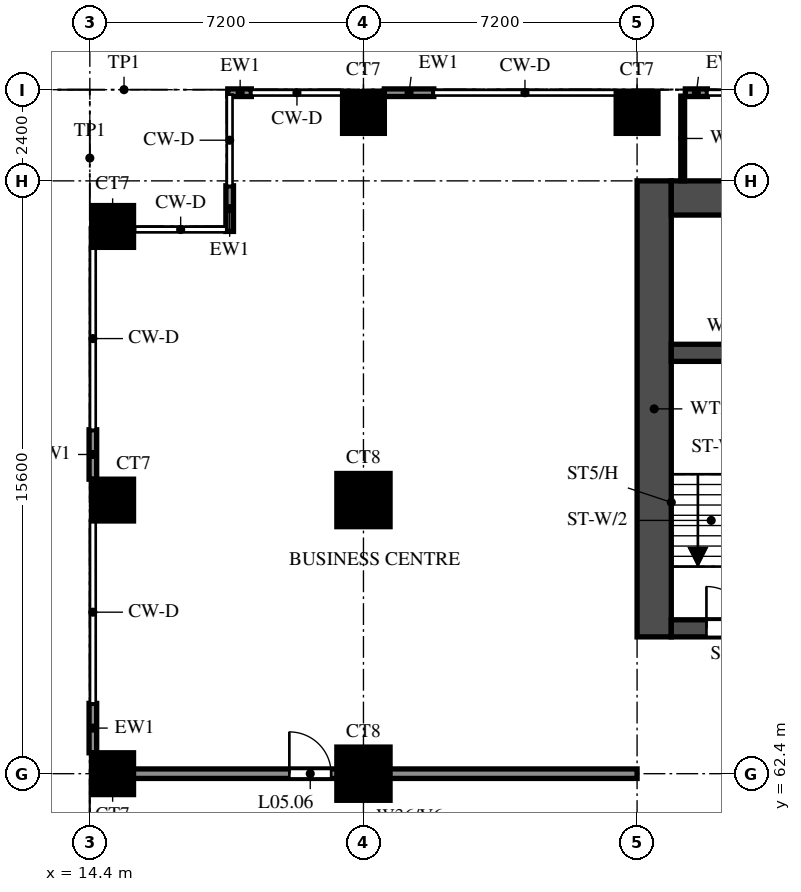
"""IFC4 building model, lengths in metres.
Left out: names, types, materials, properties, quantities, classifications, styles, units other than length and angle.
Written with IfcOpenShell. Run it as: python <this file> out.ifc"""

import sys

from ifc_helpers import new_model, si_unit, direction, frame, frame_2d, origin, origin_2d, place, context, subcontext, project, spatial, rectangle, extrude, source, transform, mapped, element, fill, save


model = new_model("IFC4")
c1 = context("Model", 3, precision=1e-05, world=origin(), true_north=direction((0.0, 1.0)))
c2 = subcontext(c1, "Body", "Model", "MODEL_VIEW")
j1 = project(units=[si_unit("LENGTHUNIT", "METRE"), si_unit("PLANEANGLEUNIT", "RADIAN")], contexts=[c1])
p1 = place(None, origin())
s1 = spatial("IfcSite", under=j1, at=p1, CompositionType="ELEMENT")
p2 = place(p1, origin())
s2 = spatial("IfcBuilding", under=s1, at=p2, CompositionType="ELEMENT")
p3 = place(p2, frame((0.0, 0.0, 27.0)))
s3 = spatial("IfcBuildingStorey", under=s2, at=p3, CompositionType="ELEMENT", Elevation=27.0)
m1 = source(origin(), c2, "Body", "SweptSolid", [
    extrude(rectangle(XDim=1.1, YDim=1.1, at=origin_2d()), origin(), (0.0, 0.0, 1.0), 3.18),
])
p4 = place(p3, frame((15.0, 62.4, 0.0), z_axis=(0.0, 0.0, 1.0), x_axis=(1.0, 0.0, 0.0)))
e1 = element("IfcColumn", 1, at=p4, inside=s3, PredefinedType="COLUMN", context=c2, shape_type="MappedRepresentation", body=[
    mapped(m1, transform((0.0, 0.0, 0.0))),
])
m2 = source(origin(), c2, "Body", "SweptSolid", [
    extrude(rectangle(XDim=1.4, YDim=1.4, at=origin_2d()), origin(), (0.0, 0.0, 1.0), 3.18),
])
p5 = place(p3, frame((21.6, 62.4, 0.0), z_axis=(0.0, 0.0, 1.0), x_axis=(1.0, 0.0, 0.0)))
e2 = element("IfcColumn", 2, at=p5, inside=s3, PredefinedType="COLUMN", context=c2, shape_type="MappedRepresentation", body=[
    mapped(m2, transform((0.0, 0.0, 0.0))),
])
p6 = place(p3, frame((15.0, 69.6, 0.0), z_axis=(0.0, 0.0, 1.0), x_axis=(1.0, 0.0, 0.0)))
e3 = element("IfcColumn", 3, at=p6, inside=s3, PredefinedType="COLUMN", context=c2, shape_type="MappedRepresentation", body=[
    mapped(m1, transform((0.0, 0.0, 0.0))),
])
p7 = place(p3, frame((21.6, 69.6, 0.0), z_axis=(0.0, 0.0, 1.0), x_axis=(1.0, 0.0, 0.0)))
e4 = element("IfcColumn", 4, at=p7, inside=s3, PredefinedType="COLUMN", context=c2, shape_type="MappedRepresentation", body=[
    mapped(m2, transform((0.0, 0.0, 0.0))),
])
for number, where, z_axis, x_axis in (
    (5, (15.0, 76.8, 0.0), (0.0, 0.0, 1.0), (1.0, 0.0, 0.0)),
    (6, (21.6, 79.8, 0.0), (0.0, 0.0, 1.0), (1.0, 0.0, 0.0)),
    (7, (28.8, 79.8, 0.0), (0.0, 0.0, 1.0), (1.0, 0.0, 0.0)),
):
    element("IfcColumn", number, at=place(p3, frame(where, z_axis=z_axis, x_axis=x_axis)), inside=s3, PredefinedType="COLUMN", context=c2, shape_type="MappedRepresentation", body=[
        mapped(m1, transform((0.0, 0.0, 0.0))),
    ])
p8 = place(p3, frame((29.25, 66.0, 0.0), z_axis=(0.0, 0.0, 1.0), x_axis=(0.0, 1.0, 0.0)))
e8 = element("IfcWall", 8, at=p8, inside=s3, PredefinedType="SHEAR", context=c2, shape_type="SweptSolid", body=[
    extrude(rectangle(XDim=12.0, YDim=0.9, at=frame_2d((6.0, 0.0))), origin(), (0.0, 0.0, 1.0), 3.18),
])
p9 = place(p3, frame((29.7, 77.55, 0.0), z_axis=(0.0, 0.0, 1.0), x_axis=(1.0, 0.0, 0.0)))
e9 = element("IfcWall", 9, at=p9, inside=s3, PredefinedType="SHEAR", context=c2, shape_type="SweptSolid", body=[
    extrude(rectangle(XDim=41.4, YDim=0.9, at=frame_2d((20.7, 0.0))), origin(), (0.0, 0.0, 1.0), 3.18),
])
p10 = place(p3, frame((29.7, 66.225, 0.0), z_axis=(0.0, 0.0, 1.0), x_axis=(1.0, 0.0, 0.0)))
e10 = element("IfcWall", 10, at=p10, inside=s3, PredefinedType="SHEAR", context=c2, shape_type="SweptSolid", body=[
    extrude(rectangle(XDim=41.4, YDim=0.45, at=frame_2d((20.7, 0.0))), origin(), (0.0, 0.0, 1.0), 3.18),
])
p11 = place(p10, frame((0.925, 0.0, 0.0)))
e11 = element("IfcOpeningElement", 11, at=p11, cuts=e10, PredefinedType="OPENING", context=c2, shape_type="SweptSolid", body=[
    extrude(rectangle(XDim=1.1, YDim=2.1, at=frame_2d((0.55, 1.05))), frame((0.0, 0.235, 0.0), z_axis=(0.0, -1.0, 0.0), x_axis=(1.0, 0.0, 0.0)), (0.0, 0.0, 1.0), 0.47),
])
p12 = place(p10, frame((3.738, 0.0, 0.0)))
e12 = element("IfcOpeningElement", 12, at=p12, cuts=e10, PredefinedType="OPENING", context=c2, shape_type="SweptSolid", body=[
    extrude(rectangle(XDim=1.8, YDim=2.1, at=frame_2d((0.9, 1.05))), frame((0.0, 0.235, 0.0), z_axis=(0.0, -1.0, 0.0), x_axis=(1.0, 0.0, 0.0)), (0.0, 0.0, 1.0), 0.47),
])
p13 = place(p3, frame((29.7, 73.475, 0.0), z_axis=(0.0, 0.0, 1.0), x_axis=(1.0, 0.0, 0.0)))
e13 = element("IfcWall", 13, at=p13, inside=s3, PredefinedType="SHEAR", context=c2, shape_type="SweptSolid", body=[
    extrude(rectangle(XDim=3.175, YDim=0.45, at=frame_2d((1.587, 0.0))), origin(), (0.0, 0.0, 1.0), 3.18),
])
p14 = place(p3, frame((30.65, 80.32, 0.0), z_axis=(0.0, 0.0, 1.0), x_axis=(-1.0, 0.0, 0.0)))
e14 = element("IfcWall", 14, at=p14, inside=s3, PredefinedType="SOLIDWALL", context=c2, shape_type="SweptSolid", body=[
    extrude(rectangle(XDim=0.58, YDim=0.2, at=frame_2d((0.29, 0.0))), origin(), (0.0, 0.0, 1.0), 3.18),
])
p15 = place(p3, frame((23.45, 80.32, 0.0), z_axis=(0.0, 0.0, 1.0), x_axis=(-1.0, 0.0, 0.0)))
e15 = element("IfcWall", 15, at=p15, inside=s3, PredefinedType="SOLIDWALL", context=c2, shape_type="SweptSolid", body=[
    extrude(rectangle(XDim=1.3, YDim=0.2, at=frame_2d((0.65, 0.0))), origin(), (0.0, 0.0, 1.0), 3.18),
])
p16 = place(p3, frame((18.65, 80.32, 0.0), z_axis=(0.0, 0.0, 1.0), x_axis=(-1.0, 0.0, 0.0)))
e16 = element("IfcWall", 16, at=p16, inside=s3, PredefinedType="SOLIDWALL", context=c2, shape_type="SweptSolid", body=[
    extrude(rectangle(XDim=0.62, YDim=0.2, at=frame_2d((0.31, 0.0))), origin(), (0.0, 0.0, 1.0), 3.18),
])
p17 = place(p3, frame((18.08, 77.87, 0.0), z_axis=(0.0, 0.0, 1.0), x_axis=(0.0, -1.0, 0.0)))
e17 = element("IfcWall", 17, at=p17, inside=s3, PredefinedType="SOLIDWALL", context=c2, shape_type="SweptSolid", body=[
    extrude(rectangle(XDim=1.2, YDim=0.2, at=frame_2d((0.6, 0.0))), origin(), (0.0, 0.0, 1.0), 3.18),
])
for number, where, z_axis, x_axis in (
    (18, (14.48, 71.45, 0.0), (0.0, 0.0, 1.0), (0.0, -1.0, 0.0)),
    (19, (14.48, 64.25, 0.0), (0.0, 0.0, 1.0), (0.0, -1.0, 0.0)),
):
    element("IfcWall", number, at=place(p3, frame(where, z_axis=z_axis, x_axis=x_axis)), inside=s3, PredefinedType="SOLIDWALL", context=c2, shape_type="SweptSolid", body=[
        extrude(rectangle(XDim=1.3, YDim=0.2, at=frame_2d((0.65, 0.0))), origin(), (0.0, 0.0, 1.0), 3.18),
    ])
p18 = place(p3, frame((14.57, 62.4, 0.0), z_axis=(0.0, 0.0, 1.0), x_axis=(1.0, 0.0, 0.0)))
e20 = element("IfcWall", 20, at=p18, inside=s3, PredefinedType="SOLIDWALL", context=c2, shape_type="SweptSolid", body=[
    extrude(rectangle(XDim=14.23, YDim=0.25, at=frame_2d((7.115, 0.0))), origin(), (0.0, 0.0, 1.0), 3.18),
])
p19 = place(p18, frame((5.08, 0.0, 0.0)))
e21 = element("IfcOpeningElement", 21, at=p19, cuts=e20, PredefinedType="OPENING", context=c2, shape_type="SweptSolid", body=[
    extrude(rectangle(XDim=1.1, YDim=2.1, at=frame_2d((0.55, 1.05))), frame((0.0, 0.135, 0.0), z_axis=(0.0, -1.0, 0.0), x_axis=(1.0, 0.0, 0.0)), (0.0, 0.0, 1.0), 0.27),
])
p20 = place(p3, frame((30.0, 78.002, 0.0), z_axis=(0.0, 0.0, 1.0), x_axis=(0.0, 1.0, 0.0)))
e22 = element("IfcWall", 22, at=p20, inside=s3, PredefinedType="PARTITIONING", context=c2, shape_type="SweptSolid", body=[
    extrude(rectangle(XDim=2.228, YDim=0.1, at=frame_2d((1.114, 0.0))), origin(), (0.0, 0.0, 1.0), 2.28),
])
p21 = place(p11, origin())
e23 = element("IfcDoor", 23, at=p21, inside=s3, OperationType="SINGLE_SWING_LEFT", PredefinedType="DOOR", context=c2, shape_type="SweptSolid", body=[
    extrude(rectangle(XDim=1.1, YDim=2.1, at=frame_2d((0.55, 1.05))), frame((0.0, 0.025, 0.0), z_axis=(0.0, -1.0, 0.0), x_axis=(1.0, 0.0, 0.0)), (0.0, 0.0, 1.0), 0.05),
])
fill(e11, e23)
p22 = place(p19, origin())
e24 = element("IfcDoor", 24, at=p22, inside=s3, OperationType="SINGLE_SWING_LEFT", PredefinedType="DOOR", context=c2, shape_type="SweptSolid", body=[
    extrude(rectangle(XDim=1.1, YDim=2.1, at=frame_2d((0.55, 1.05))), frame((0.0, 0.025, 0.0), z_axis=(0.0, -1.0, 0.0), x_axis=(1.0, 0.0, 0.0)), (0.0, 0.0, 1.0), 0.05),
])
fill(e21, e24)
save(model, sys.argv[1])
